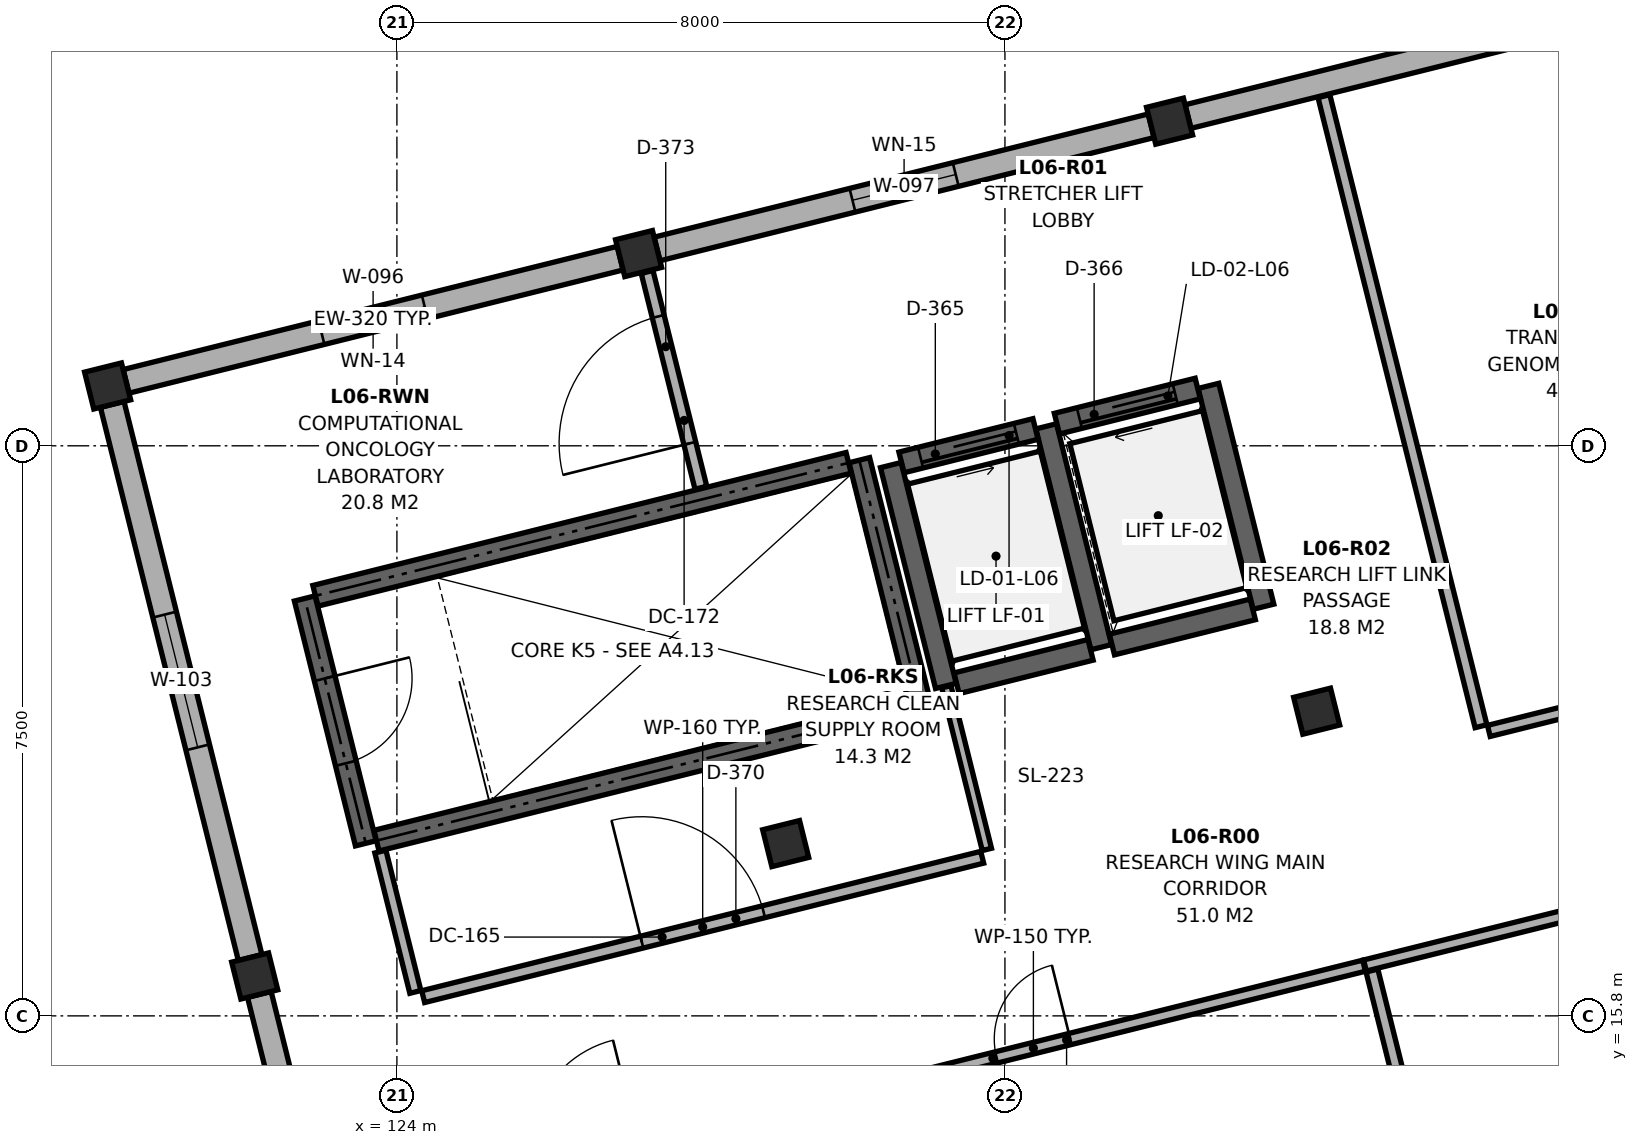
"""IFC4 building model, lengths in metres.
Left out: names, types, materials, properties, quantities, classifications, styles, units other than length and angle.
Written with IfcOpenShell. Run it as: python <this file> out.ifc"""

import sys

from ifc_helpers import new_model, si_unit, direction, frame, frame_2d, origin, origin_2d, place, context, subcontext, project, spatial, rectangle, extrude, element, fill, save


model = new_model("IFC4")
c1 = context("Model", 3, precision=1e-05, world=origin(), true_north=direction((0.0, 1.0)))
c2 = subcontext(c1, "Body", "Model", "MODEL_VIEW")
j1 = project(units=[si_unit("LENGTHUNIT", "METRE"), si_unit("PLANEANGLEUNIT", "RADIAN")], contexts=[c1])
p1 = place(None, origin())
s1 = spatial("IfcSite", under=j1, at=p1, CompositionType="ELEMENT")
p2 = place(p1, origin())
s2 = spatial("IfcBuilding", under=s1, at=p2, CompositionType="ELEMENT")
p3 = place(p2, frame((0.0, 0.0, 25.5)))
s3 = spatial("IfcBuildingStorey", under=s2, at=p3, CompositionType="ELEMENT", Elevation=25.5)
for number, where, z_axis, x_axis in (
    (1, (122.129, 16.325, 0.0), (0.0, 0.0, 1.0), (0.97, 0.242, 0.0)),
    (2, (120.194, 24.087, 0.0), (0.0, 0.0, 1.0), (0.97, 0.242, 0.0)),
):
    element("IfcColumn", number, at=place(p3, frame(where, z_axis=z_axis, x_axis=x_axis)), inside=s3, PredefinedType="COLUMN", context=c2, shape_type="SweptSolid", body=[
        extrude(rectangle(XDim=0.5, YDim=0.5, at=origin_2d()), origin(), (0.0, 0.0, 1.0), 3.819),
    ])
for number, where, z_axis, x_axis in (
    (3, (129.115, 18.067, 0.0), (0.0, 0.0, 1.0), (0.97, 0.242, 0.0)),
    (4, (127.18, 25.829, 0.0), (0.0, 0.0, 1.0), (0.97, 0.242, 0.0)),
):
    element("IfcColumn", number, at=place(p3, frame(where, z_axis=z_axis, x_axis=x_axis)), inside=s3, PredefinedType="COLUMN", context=c2, shape_type="SweptSolid", body=[
        extrude(rectangle(XDim=0.5, YDim=0.5, at=origin_2d()), origin(), (0.0, 0.0, 1.0), 4.42),
    ])
for number, where, z_axis, x_axis in (
    (5, (136.102, 19.808, 0.0), (0.0, 0.0, 1.0), (0.97, 0.242, 0.0)),
    (6, (134.166, 27.571, 0.0), (0.0, 0.0, 1.0), (0.97, 0.242, 0.0)),
):
    element("IfcColumn", number, at=place(p3, frame(where, z_axis=z_axis, x_axis=x_axis)), inside=s3, PredefinedType="COLUMN", context=c2, shape_type="SweptSolid", body=[
        extrude(rectangle(XDim=0.5, YDim=0.5, at=origin_2d()), origin(), (0.0, 0.0, 1.0), 3.818),
    ])
p4 = place(p3, frame((120.437, 24.147, 0.0), z_axis=(0.0, 0.0, 1.0), x_axis=(0.970288079516, 0.241952563016, 0.0)))
e7 = element("IfcWall", 7, at=p4, inside=s3, PredefinedType="SOLIDWALL", context=c2, shape_type="SweptSolid", body=[
    extrude(rectangle(XDim=6.7, YDim=0.32, at=frame_2d((3.35, 0.0))), origin(), (0.0, 0.0, 1.0), 3.7),
])
p5 = place(p4, frame((2.65, 0.0, 0.9)))
e8 = element("IfcOpeningElement", 8, at=p5, cuts=e7, PredefinedType="OPENING", context=c2, shape_type="SweptSolid", body=[
    extrude(rectangle(XDim=1.4, YDim=1.5, at=frame_2d((0.7, 0.75))), frame((0.0, 0.172, 0.0), z_axis=(0.0, -1.0, 0.0), x_axis=(1.0, 0.0, 0.0)), (0.0, 0.0, 1.0), 0.344),
])
p6 = place(p3, frame((127.423, 25.889, 0.0), z_axis=(0.0, 0.0, 1.0), x_axis=(0.970296633454, 0.241918257079, 0.0)))
e9 = element("IfcWall", 9, at=p6, inside=s3, PredefinedType="SOLIDWALL", context=c2, shape_type="SweptSolid", body=[
    extrude(rectangle(XDim=6.7, YDim=0.32, at=frame_2d((3.35, 0.0))), origin(), (0.0, 0.0, 1.0), 3.7),
])
p7 = place(p6, frame((2.65, 0.0, 0.9)))
e10 = element("IfcOpeningElement", 10, at=p7, cuts=e9, PredefinedType="OPENING", context=c2, shape_type="SweptSolid", body=[
    extrude(rectangle(XDim=1.4, YDim=1.7, at=frame_2d((0.7, 0.85))), frame((0.0, 0.172, 0.0), z_axis=(0.0, -1.0, 0.0), x_axis=(1.0, 0.0, 0.0)), (0.0, 0.0, 1.0), 0.344),
])
p8 = place(p3, frame((134.409, 27.631, 0.0), z_axis=(0.0, 0.0, 1.0), x_axis=(0.97030006528, 0.241904492141, 0.0)))
e11 = element("IfcWall", 11, at=p8, inside=s3, PredefinedType="SOLIDWALL", context=c2, shape_type="SweptSolid", body=[
    extrude(rectangle(XDim=7.1, YDim=0.32, at=frame_2d((3.55, 0.0))), origin(), (0.0, 0.0, 1.0), 3.7),
])
p9 = place(p3, frame((124.004, 8.805, 0.0), z_axis=(0.0, 0.0, 1.0), x_axis=(-0.241922842305, 0.970295490235, 0.0)))
e12 = element("IfcWall", 12, at=p9, inside=s3, PredefinedType="SOLIDWALL", context=c2, shape_type="SweptSolid", body=[
    extrude(rectangle(XDim=7.5, YDim=0.32, at=frame_2d((3.75, 0.0))), origin(), (0.0, 0.0, 1.0), 3.7),
])
p10 = place(p9, frame((2.75, 0.0, 0.9)))
e13 = element("IfcOpeningElement", 13, at=p10, cuts=e12, PredefinedType="OPENING", context=c2, shape_type="SweptSolid", body=[
    extrude(rectangle(XDim=2.0, YDim=1.9, at=frame_2d((1.0, 0.95))), frame((0.0, 0.172, 0.0), z_axis=(0.0, -1.0, 0.0), x_axis=(1.0, 0.0, 0.0)), (0.0, 0.0, 1.0), 0.344),
])
p11 = place(p3, frame((122.069, 16.567, 0.0), z_axis=(0.0, 0.0, 1.0), x_axis=(-0.241930483572, 0.970293585014, 0.0)))
e14 = element("IfcWall", 14, at=p11, inside=s3, PredefinedType="SOLIDWALL", context=c2, shape_type="SweptSolid", body=[
    extrude(rectangle(XDim=7.5, YDim=0.32, at=frame_2d((3.75, 0.0))), origin(), (0.0, 0.0, 1.0), 3.7),
])
p12 = place(p11, frame((2.85, 0.0, 0.9)))
e15 = element("IfcOpeningElement", 15, at=p12, cuts=e14, PredefinedType="OPENING", context=c2, shape_type="SweptSolid", body=[
    extrude(rectangle(XDim=1.8, YDim=1.3, at=frame_2d((0.9, 0.65))), frame((0.0, 0.172, 0.0), z_axis=(0.0, -1.0, 0.0), x_axis=(1.0, 0.0, 0.0)), (0.0, 0.0, 1.0), 0.344),
])
p13 = place(p3, frame((123.731, 18.105, 0.0), z_axis=(0.0, 0.0, 1.0), x_axis=(0.970297238923, 0.241915828623, 0.0)))
e16 = element("IfcWall", 16, at=p13, inside=s3, PredefinedType="SHEAR", context=c2, shape_type="SweptSolid", body=[
    extrude(rectangle(XDim=7.23, YDim=0.28, at=frame_2d((3.615, 0.0))), origin(), (0.0, 0.0, 1.0), 3.8),
])
p14 = place(p3, frame((130.887, 19.889, 0.0), z_axis=(0.0, 0.0, 1.0), x_axis=(-0.241947258837, 0.970289402158, 0.0)))
e17 = element("IfcWall", 17, at=p14, inside=s3, PredefinedType="SHEAR", context=c2, shape_type="SweptSolid", body=[
    extrude(rectangle(XDim=3.32, YDim=0.28, at=frame_2d((1.66, 0.0))), origin(), (0.0, 0.0, 1.0), 3.8),
])
p15 = place(p3, frame((129.943, 23.076, 0.0), z_axis=(0.0, 0.0, 1.0), x_axis=(-0.970289312034, -0.241947620266, 0.0)))
e18 = element("IfcWall", 18, at=p15, inside=s3, PredefinedType="SHEAR", context=c2, shape_type="SweptSolid", body=[
    extrude(rectangle(XDim=7.23, YDim=0.28, at=frame_2d((3.615, 0.0))), origin(), (0.0, 0.0, 1.0), 3.8),
])
p16 = place(p3, frame((122.787, 21.292, 0.0), z_axis=(0.0, 0.0, 1.0), x_axis=(0.241860763027, -0.970310966293, 0.0)))
e19 = element("IfcWall", 19, at=p16, inside=s3, PredefinedType="SHEAR", context=c2, shape_type="SweptSolid", body=[
    extrude(rectangle(XDim=3.32, YDim=0.28, at=frame_2d((1.66, 0.0))), origin(), (0.0, 0.0, 1.0), 3.8),
])
p17 = place(p16, frame((1.085, 0.0, 0.0)))
e20 = element("IfcOpeningElement", 20, at=p17, cuts=e19, PredefinedType="OPENING", context=c2, shape_type="SweptSolid", body=[
    extrude(rectangle(XDim=1.15, YDim=2.15, at=frame_2d((0.575, 1.075))), frame((0.0, 0.152, 0.0), z_axis=(0.0, -1.0, 0.0), x_axis=(1.0, 0.0, 0.0)), (0.0, 0.0, 1.0), 0.304),
])
p18 = place(p3, frame((131.363, 20.176, 0.0), z_axis=(0.0, 0.0, 1.0), x_axis=(0.970284587517, 0.241966566341, 0.0)))
e21 = element("IfcWall", 21, at=p18, inside=s3, PredefinedType="SHEAR", context=c2, shape_type="SweptSolid", body=[
    extrude(rectangle(XDim=1.817, YDim=0.28, at=frame_2d((0.909, 0.0))), origin(), (0.0, 0.0, 1.0), 5.3),
])
p19 = place(p3, frame((133.267, 20.651, 0.0), z_axis=(0.0, 0.0, 1.0), x_axis=(-0.241921647353, 0.970295788171, 0.0)))
e22 = element("IfcWall", 22, at=p19, inside=s3, PredefinedType="SHEAR", context=c2, shape_type="SweptSolid", body=[
    extrude(rectangle(XDim=2.994, YDim=0.28, at=frame_2d((1.497, 0.0))), origin(), (0.0, 0.0, 1.0), 5.3),
])
p20 = place(p3, frame((132.402, 23.521, 0.0), z_axis=(0.0, 0.0, 1.0), x_axis=(-0.970284587517, -0.241966566341, 0.0)))
e23 = element("IfcWall", 23, at=p20, inside=s3, PredefinedType="SHEAR", context=c2, shape_type="SweptSolid", body=[
    extrude(rectangle(XDim=1.817, YDim=0.28, at=frame_2d((0.909, 0.0))), origin(), (0.0, 0.0, 1.0), 5.3),
])
p21 = place(p20, frame((0.259, 0.0, 0.0)))
e24 = element("IfcOpeningElement", 24, at=p21, cuts=e23, PredefinedType="OPENING", context=c2, shape_type="SweptSolid", body=[
    extrude(rectangle(XDim=1.3, YDim=2.2, at=frame_2d((0.65, 1.1))), frame((0.0, 0.152, 0.0), z_axis=(0.0, -1.0, 0.0), x_axis=(1.0, 0.0, 0.0)), (0.0, 0.0, 1.0), 0.304),
])
p22 = place(p3, frame((130.498, 23.046, 0.0), z_axis=(0.0, 0.0, 1.0), x_axis=(0.241921647353, -0.970295788171, 0.0)))
e25 = element("IfcWall", 25, at=p22, inside=s3, PredefinedType="SHEAR", context=c2, shape_type="SweptSolid", body=[
    extrude(rectangle(XDim=2.994, YDim=0.28, at=frame_2d((1.497, 0.0))), origin(), (0.0, 0.0, 1.0), 5.3),
])
p23 = place(p3, frame((133.408, 20.686, 0.0), z_axis=(0.0, 0.0, 1.0), x_axis=(0.970285190026, 0.241964150272, 0.0)))
e26 = element("IfcWall", 26, at=p23, inside=s3, PredefinedType="SHEAR", context=c2, shape_type="SweptSolid", body=[
    extrude(rectangle(XDim=1.91, YDim=0.28, at=frame_2d((0.955, 0.0))), origin(), (0.0, 0.0, 1.0), 5.3),
])
p24 = place(p3, frame((135.402, 21.183, 0.0), z_axis=(0.0, 0.0, 1.0), x_axis=(-0.241921647353, 0.970295788171, 0.0)))
e27 = element("IfcWall", 27, at=p24, inside=s3, PredefinedType="SHEAR", context=c2, shape_type="SweptSolid", body=[
    extrude(rectangle(XDim=2.994, YDim=0.28, at=frame_2d((1.497, 0.0))), origin(), (0.0, 0.0, 1.0), 5.3),
])
p25 = place(p3, frame((134.537, 24.053, 0.0), z_axis=(0.0, 0.0, 1.0), x_axis=(-0.970285190026, -0.241964150272, 0.0)))
e28 = element("IfcWall", 28, at=p25, inside=s3, PredefinedType="SHEAR", context=c2, shape_type="SweptSolid", body=[
    extrude(rectangle(XDim=1.91, YDim=0.28, at=frame_2d((0.955, 0.0))), origin(), (0.0, 0.0, 1.0), 5.3),
])
p26 = place(p25, frame((0.305, 0.0, 0.0)))
e29 = element("IfcOpeningElement", 29, at=p26, cuts=e28, PredefinedType="OPENING", context=c2, shape_type="SweptSolid", body=[
    extrude(rectangle(XDim=1.3, YDim=2.2, at=frame_2d((0.65, 1.1))), frame((0.0, 0.152, 0.0), z_axis=(0.0, -1.0, 0.0), x_axis=(1.0, 0.0, 0.0)), (0.0, 0.0, 1.0), 0.304),
])
p27 = place(p3, frame((124.346, 16.053, 0.0), z_axis=(0.0, 0.0, 1.0), x_axis=(0.970295772287, 0.241921711059, 0.0)))
e30 = element("IfcWall", 30, at=p27, inside=s3, PredefinedType="PARTITIONING", context=c2, shape_type="SweptSolid", body=[
    extrude(rectangle(XDim=7.58, YDim=0.16, at=frame_2d((3.79, 0.0))), origin(), (0.0, 0.0, 1.0), 3.7),
])
p28 = place(p27, frame((2.965, 0.0, 0.0)))
e31 = element("IfcOpeningElement", 31, at=p28, cuts=e30, PredefinedType="OPENING", context=c2, shape_type="SweptSolid", body=[
    extrude(rectangle(XDim=1.65, YDim=2.32, at=frame_2d((0.825, 1.16))), frame((0.0, 0.092, 0.0), z_axis=(0.0, -1.0, 0.0), x_axis=(1.0, 0.0, 0.0)), (0.0, 0.0, 1.0), 0.184),
])
p29 = place(p3, frame((128.0, 22.748, 0.0), z_axis=(0.0, 0.0, 1.0), x_axis=(-0.24188769692, 0.970304252324, 0.0)))
e32 = element("IfcWall", 32, at=p29, inside=s3, PredefinedType="PARTITIONING", context=c2, shape_type="SweptSolid", body=[
    extrude(rectangle(XDim=2.926, YDim=0.16, at=frame_2d((1.463, 0.0))), origin(), (0.0, 0.0, 1.0), 3.7),
])
p30 = place(p29, frame((0.603, 0.0, 0.0)))
e33 = element("IfcOpeningElement", 33, at=p30, cuts=e32, PredefinedType="OPENING", context=c2, shape_type="SweptSolid", body=[
    extrude(rectangle(XDim=1.72, YDim=2.34, at=frame_2d((0.86, 1.17))), frame((0.0, 0.092, 0.0), z_axis=(0.0, -1.0, 0.0), x_axis=(1.0, 0.0, 0.0)), (0.0, 0.0, 1.0), 0.184),
])
p31 = place(p3, frame((128.023, 14.29, 0.0), z_axis=(0.0, 0.0, 1.0), x_axis=(0.9702992324, 0.241907832869, 0.0)))
e34 = element("IfcWall", 34, at=p31, inside=s3, PredefinedType="PARTITIONING", context=c2, shape_type="SweptSolid", body=[
    extrude(rectangle(XDim=8.968, YDim=0.15, at=frame_2d((4.484, 0.0))), origin(), (0.0, 0.0, 1.0), 3.7),
])
p32 = place(p31, frame((3.984, 0.0, 0.0)))
e35 = element("IfcOpeningElement", 35, at=p32, cuts=e34, PredefinedType="OPENING", context=c2, shape_type="SweptSolid", body=[
    extrude(rectangle(XDim=1.0, YDim=2.15, at=frame_2d((0.5, 1.075))), frame((0.0, 0.087, 0.0), z_axis=(0.0, -1.0, 0.0), x_axis=(1.0, 0.0, 0.0)), (0.0, 0.0, 1.0), 0.174),
])
p33 = place(p3, frame((136.737, 16.463, 0.0), z_axis=(0.0, 0.0, 1.0), x_axis=(0.970289496005, 0.24194688248, 0.0)))
e36 = element("IfcWall", 36, at=p33, inside=s3, PredefinedType="PARTITIONING", context=c2, shape_type="SweptSolid", body=[
    extrude(rectangle(XDim=7.221, YDim=0.15, at=frame_2d((3.61, 0.0))), origin(), (0.0, 0.0, 1.0), 3.7),
])
p34 = place(p33, frame((3.085, 0.0, 0.0)))
e37 = element("IfcOpeningElement", 37, at=p34, cuts=e36, PredefinedType="OPENING", context=c2, shape_type="SweptSolid", body=[
    extrude(rectangle(XDim=1.05, YDim=2.15, at=frame_2d((0.525, 1.075))), frame((0.0, 0.087, 0.0), z_axis=(0.0, -1.0, 0.0), x_axis=(1.0, 0.0, 0.0)), (0.0, 0.0, 1.0), 0.174),
])
p35 = place(p3, frame((138.367, 19.549, 0.0), z_axis=(0.0, 0.0, 1.0), x_axis=(0.970289077222, 0.241948561938, 0.0)))
e38 = element("IfcWall", 38, at=p35, inside=s3, PredefinedType="PARTITIONING", context=c2, shape_type="SweptSolid", body=[
    extrude(rectangle(XDim=4.893, YDim=0.15, at=frame_2d((2.446, 0.0))), origin(), (0.0, 0.0, 1.0), 3.7),
])
p36 = place(p35, frame((1.846, 0.0, 0.0)))
e39 = element("IfcOpeningElement", 39, at=p36, cuts=e38, PredefinedType="OPENING", context=c2, shape_type="SweptSolid", body=[
    extrude(rectangle(XDim=1.2, YDim=2.15, at=frame_2d((0.6, 1.075))), frame((0.0, 0.087, 0.0), z_axis=(0.0, -1.0, 0.0), x_axis=(1.0, 0.0, 0.0)), (0.0, 0.0, 1.0), 0.174),
])
p37 = place(p3, frame((124.243, 16.115, 0.0), z_axis=(0.0, 0.0, 1.0), x_axis=(-0.241962034071, 0.970285717749, 0.0)))
e40 = element("IfcWall", 40, at=p37, inside=s3, PredefinedType="PARTITIONING", context=c2, shape_type="SweptSolid", body=[
    extrude(rectangle(XDim=1.903, YDim=0.15, at=frame_2d((0.952, 0.0))), origin(), (0.0, 0.0, 1.0), 3.7),
])
p38 = place(p3, frame((131.763, 17.99, 0.0), z_axis=(0.0, 0.0, 1.0), x_axis=(-0.241962612769, 0.970285573438, 0.0)))
e41 = element("IfcWall", 41, at=p38, inside=s3, PredefinedType="PARTITIONING", context=c2, shape_type="SweptSolid", body=[
    extrude(rectangle(XDim=2.206, YDim=0.125, at=frame_2d((1.103, 0.0))), origin(), (0.0, 0.0, 1.0), 3.7),
])
p39 = place(p3, frame((137.87, 12.22, 0.0), z_axis=(0.0, 0.0, 1.0), x_axis=(-0.241948270812, 0.970289149816, 0.0)))
e42 = element("IfcWall", 42, at=p39, inside=s3, PredefinedType="PARTITIONING", context=c2, shape_type="SweptSolid", body=[
    extrude(rectangle(XDim=4.304, YDim=0.16, at=frame_2d((2.152, 0.0))), origin(), (0.0, 0.0, 1.0), 3.7),
])
p40 = place(p3, frame((138.264, 19.611, 0.0), z_axis=(0.0, 0.0, 1.0), x_axis=(-0.241937132378, 0.970291927193, 0.0)))
e43 = element("IfcWall", 43, at=p40, inside=s3, PredefinedType="PARTITIONING", context=c2, shape_type="SweptSolid", body=[
    extrude(rectangle(XDim=8.543, YDim=0.16, at=frame_2d((4.271, 0.0))), origin(), (0.0, 0.0, 1.0), 3.7),
])
p41 = place(p5, origin())
e44 = element("IfcWindow", 44, at=p41, inside=s3, PartitioningType="SINGLE_PANEL", PredefinedType="WINDOW", context=c2, shape_type="SweptSolid", body=[
    extrude(rectangle(XDim=1.4, YDim=1.5, at=frame_2d((0.7, 0.75))), frame((0.0, 0.03, 0.0), z_axis=(0.0, -1.0, 0.0), x_axis=(1.0, 0.0, 0.0)), (0.0, 0.0, 1.0), 0.06),
])
fill(e8, e44)
p42 = place(p7, origin())
e45 = element("IfcWindow", 45, at=p42, inside=s3, PartitioningType="SINGLE_PANEL", PredefinedType="WINDOW", context=c2, shape_type="SweptSolid", body=[
    extrude(rectangle(XDim=1.4, YDim=1.7, at=frame_2d((0.7, 0.85))), frame((0.0, 0.03, 0.0), z_axis=(0.0, -1.0, 0.0), x_axis=(1.0, 0.0, 0.0)), (0.0, 0.0, 1.0), 0.06),
])
fill(e10, e45)
p43 = place(p12, origin())
e46 = element("IfcWindow", 46, at=p43, inside=s3, PartitioningType="DOUBLE_PANEL_VERTICAL", PredefinedType="WINDOW", context=c2, shape_type="SweptSolid", body=[
    extrude(rectangle(XDim=1.8, YDim=1.3, at=frame_2d((0.9, 0.65))), frame((0.0, 0.03, 0.0), z_axis=(0.0, -1.0, 0.0), x_axis=(1.0, 0.0, 0.0)), (0.0, 0.0, 1.0), 0.06),
])
fill(e15, e46)
p44 = place(p17, origin())
e47 = element("IfcDoor", 47, at=p44, inside=s3, OperationType="SINGLE_SWING_LEFT", PredefinedType="DOOR", context=c2, shape_type="SweptSolid", body=[
    extrude(rectangle(XDim=1.15, YDim=2.15, at=frame_2d((0.575, 1.075))), frame((0.0, 0.025, 0.0), z_axis=(0.0, -1.0, 0.0), x_axis=(1.0, 0.0, 0.0)), (0.0, 0.0, 1.0), 0.05),
])
fill(e20, e47)
p45 = place(p21, origin())
e48 = element("IfcDoor", 48, at=p45, inside=s3, OperationType="SLIDING_TO_LEFT", PredefinedType="DOOR", context=c2, shape_type="SweptSolid", body=[
    extrude(rectangle(XDim=1.3, YDim=2.2, at=frame_2d((0.65, 1.1))), frame((0.0, 0.025, 0.0), z_axis=(0.0, -1.0, 0.0), x_axis=(1.0, 0.0, 0.0)), (0.0, 0.0, 1.0), 0.05),
])
fill(e24, e48)
p46 = place(p26, origin())
e49 = element("IfcDoor", 49, at=p46, inside=s3, OperationType="SLIDING_TO_RIGHT", PredefinedType="DOOR", context=c2, shape_type="SweptSolid", body=[
    extrude(rectangle(XDim=1.3, YDim=2.2, at=frame_2d((0.65, 1.1))), frame((0.0, 0.025, 0.0), z_axis=(0.0, -1.0, 0.0), x_axis=(1.0, 0.0, 0.0)), (0.0, 0.0, 1.0), 0.05),
])
fill(e29, e49)
p47 = place(p28, origin())
e50 = element("IfcDoor", 50, at=p47, inside=s3, OperationType="SINGLE_SWING_LEFT", PredefinedType="DOOR", context=c2, shape_type="SweptSolid", body=[
    extrude(rectangle(XDim=1.65, YDim=2.32, at=frame_2d((0.825, 1.16))), frame((0.0, 0.025, 0.0), z_axis=(0.0, -1.0, 0.0), x_axis=(1.0, 0.0, 0.0)), (0.0, 0.0, 1.0), 0.05),
])
fill(e31, e50)
p48 = place(p30, origin())
e51 = element("IfcDoor", 51, at=p48, inside=s3, OperationType="SINGLE_SWING_LEFT", PredefinedType="DOOR", context=c2, shape_type="SweptSolid", body=[
    extrude(rectangle(XDim=1.72, YDim=2.34, at=frame_2d((0.86, 1.17))), frame((0.0, 0.025, 0.0), z_axis=(0.0, -1.0, 0.0), x_axis=(1.0, 0.0, 0.0)), (0.0, 0.0, 1.0), 0.05),
])
fill(e33, e51)
p49 = place(p32, origin())
e52 = element("IfcDoor", 52, at=p49, inside=s3, OperationType="SINGLE_SWING_RIGHT", PredefinedType="DOOR", context=c2, shape_type="SweptSolid", body=[
    extrude(rectangle(XDim=1.0, YDim=2.15, at=frame_2d((0.5, 1.075))), frame((0.0, 0.025, 0.0), z_axis=(0.0, -1.0, 0.0), x_axis=(1.0, 0.0, 0.0)), (0.0, 0.0, 1.0), 0.05),
])
fill(e35, e52)
save(model, sys.argv[1])
